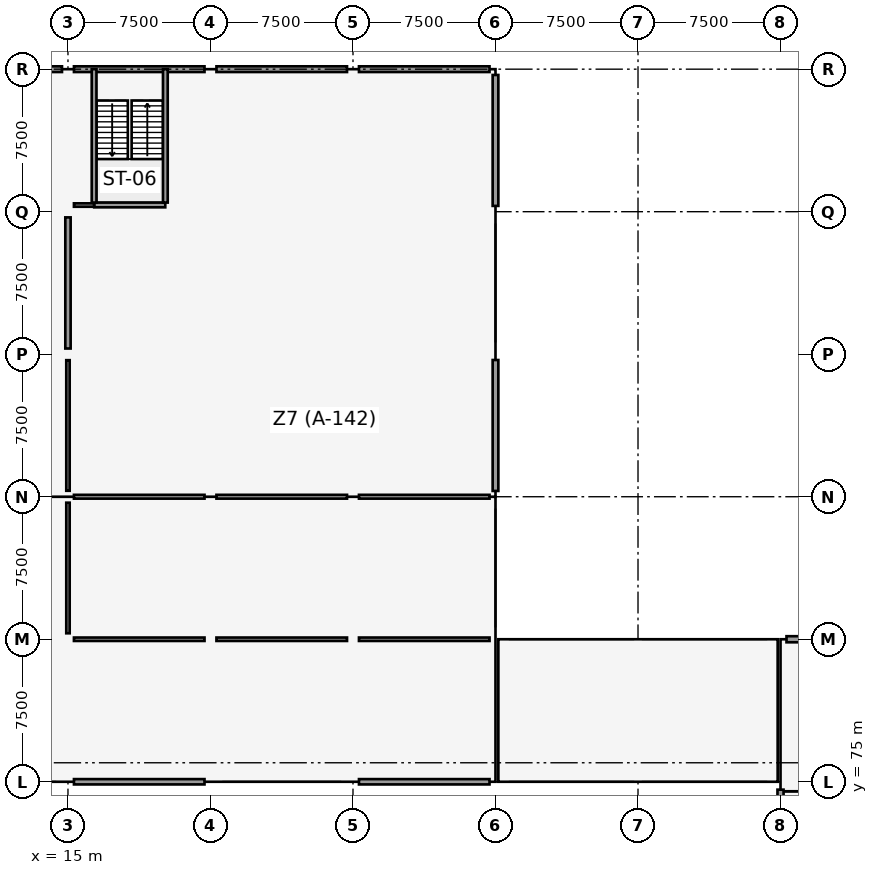
"""IFC4 building model, lengths in metres.
Left out: names, types, materials, properties, quantities, classifications, styles, units other than length and angle.
Written with IfcOpenShell. Run it as: python <this file> out.ifc"""

import sys

from ifc_helpers import new_model, si_unit, direction, frame, frame_2d, origin, origin_2d, place, context, subcontext, project, spatial, rectangle, extrude, element, fill, save


model = new_model("IFC4")
c1 = context("Model", 3, precision=1e-05, world=origin(), true_north=direction((0.0, 1.0)))
c2 = subcontext(c1, "Body", "Model", "MODEL_VIEW")
j1 = project(units=[si_unit("LENGTHUNIT", "METRE"), si_unit("PLANEANGLEUNIT", "RADIAN")], contexts=[c1])
p1 = place(None, origin())
s1 = spatial("IfcSite", under=j1, at=p1, CompositionType="ELEMENT")
p2 = place(p1, origin())
s2 = spatial("IfcBuilding", under=s1, at=p2, CompositionType="ELEMENT")
p3 = place(p2, frame((0.0, 0.0, 9.0)))
s3 = spatial("IfcBuildingStorey", under=s2, at=p3, CompositionType="ELEMENT", Elevation=9.0)
p4 = place(p3, frame((52.5, 75.0, 0.0), z_axis=(0.0, 0.0, 1.0), x_axis=(1.0, 0.0, 0.0)))
e1 = element("IfcColumn", 1, at=p4, inside=s3, PredefinedType="COLUMN", context=c2, shape_type="SweptSolid", body=[
    extrude(rectangle(XDim=0.8, YDim=0.8, at=origin_2d()), origin(), (0.0, 0.0, 1.0), 4.2),
])
p5 = place(p3, frame((52.5, 82.5, 0.0), z_axis=(0.0, 0.0, 1.0), x_axis=(1.0, 0.0, 0.0)))
e2 = element("IfcColumn", 2, at=p5, inside=s3, PredefinedType="COLUMN", context=c2, shape_type="SweptSolid", body=[
    extrude(rectangle(XDim=0.6, YDim=1.1, at=origin_2d()), origin(), (0.0, 0.0, 1.0), 4.2),
])
for number, where, z_axis, x_axis in (
    (3, (15.0, 75.0, 0.0), (0.0, 0.0, 1.0), (1.0, 0.0, 0.0)),
    (4, (15.0, 82.5, 0.0), (0.0, 0.0, 1.0), (1.0, 0.0, 0.0)),
    (5, (15.0, 90.0, 0.0), (0.0, 0.0, 1.0), (1.0, 0.0, 0.0)),
    (6, (15.0, 97.5, 0.0), (0.0, 0.0, 1.0), (1.0, 0.0, 0.0)),
    (7, (15.0, 105.0, 0.0), (0.0, 0.0, 1.0), (1.0, 0.0, 0.0)),
    (8, (15.0, 112.5, 0.0), (0.0, 0.0, 1.0), (1.0, 0.0, 0.0)),
    (9, (22.5, 75.0, 0.0), (0.0, 0.0, 1.0), (1.0, 0.0, 0.0)),
    (10, (22.5, 82.5, 0.0), (0.0, 0.0, 1.0), (1.0, 0.0, 0.0)),
    (11, (22.5, 90.0, 0.0), (0.0, 0.0, 1.0), (1.0, 0.0, 0.0)),
    (12, (22.5, 97.5, 0.0), (0.0, 0.0, 1.0), (1.0, 0.0, 0.0)),
    (13, (22.5, 105.0, 0.0), (0.0, 0.0, 1.0), (1.0, 0.0, 0.0)),
    (14, (22.5, 112.5, 0.0), (0.0, 0.0, 1.0), (1.0, 0.0, 0.0)),
    (15, (30.0, 75.0, 0.0), (0.0, 0.0, 1.0), (1.0, 0.0, 0.0)),
    (16, (30.0, 82.5, 0.0), (0.0, 0.0, 1.0), (1.0, 0.0, 0.0)),
    (17, (30.0, 90.0, 0.0), (0.0, 0.0, 1.0), (1.0, 0.0, 0.0)),
    (18, (30.0, 97.5, 0.0), (0.0, 0.0, 1.0), (1.0, 0.0, 0.0)),
    (19, (30.0, 105.0, 0.0), (0.0, 0.0, 1.0), (1.0, 0.0, 0.0)),
    (20, (30.0, 112.5, 0.0), (0.0, 0.0, 1.0), (1.0, 0.0, 0.0)),
    (21, (37.5, 75.0, 0.0), (0.0, 0.0, 1.0), (1.0, 0.0, 0.0)),
    (22, (37.5, 82.5, 0.0), (0.0, 0.0, 1.0), (1.0, 0.0, 0.0)),
    (23, (37.5, 90.0, 0.0), (0.0, 0.0, 1.0), (1.0, 0.0, 0.0)),
    (24, (37.5, 97.5, 0.0), (0.0, 0.0, 1.0), (1.0, 0.0, 0.0)),
    (25, (37.5, 105.0, 0.0), (0.0, 0.0, 1.0), (1.0, 0.0, 0.0)),
    (26, (37.5, 112.5, 0.0), (0.0, 0.0, 1.0), (1.0, 0.0, 0.0)),
):
    element("IfcColumn", number, at=place(p3, frame(where, z_axis=z_axis, x_axis=x_axis)), inside=s3, PredefinedType="COLUMN", context=c2, shape_type="SweptSolid", body=[
        extrude(rectangle(XDim=0.6, YDim=0.6, at=origin_2d()), origin(), (0.0, 0.0, 1.0), 4.2),
    ])
p6 = place(p3, frame((15.0, 97.8, 0.0), z_axis=(0.0, 0.0, 1.0), x_axis=(0.0, 1.0, 0.0)))
e27 = element("IfcWall", 27, at=p6, inside=s3, PredefinedType="SHEAR", context=c2, shape_type="SweptSolid", body=[
    extrude(rectangle(XDim=6.9, YDim=0.28, at=frame_2d((3.45, 0.0))), origin(), (0.0, 0.0, 1.0), 3.9),
])
p7 = place(p3, frame((52.5, 67.915, 0.0), z_axis=(0.0, 0.0, 1.0), x_axis=(0.0, 1.0, 0.0)))
e28 = element("IfcWall", 28, at=p7, inside=s3, PredefinedType="SOLIDWALL", context=c2, shape_type="SweptSolid", body=[
    extrude(rectangle(XDim=6.67, YDim=0.32, at=frame_2d((3.335, 0.0))), origin(), (0.0, 0.0, 1.0), 2.92),
])
p8 = place(p3, frame((52.815, 82.5, 0.0), z_axis=(0.0, 0.0, 1.0), x_axis=(1.0, 0.0, 0.0)))
e29 = element("IfcWall", 29, at=p8, inside=s3, PredefinedType="SOLIDWALL", context=c2, shape_type="SweptSolid", body=[
    extrude(rectangle(XDim=6.77, YDim=0.32, at=frame_2d((3.385, 0.0))), origin(), (0.0, 0.0, 1.0), 3.12),
])
p9 = place(p8, frame((2.86, 0.0, 0.6)))
e30 = element("IfcOpeningElement", 30, at=p9, cuts=e29, PredefinedType="OPENING", context=c2, shape_type="SweptSolid", body=[
    extrude(rectangle(XDim=1.15, YDim=1.3, at=frame_2d((0.575, 0.65))), frame((0.0, 0.17, 0.0), z_axis=(0.0, -1.0, 0.0), x_axis=(1.0, 0.0, 0.0)), (0.0, 0.0, 1.0), 0.34),
])
p10 = place(p3, frame((8.12, 112.5, 0.0), z_axis=(0.0, 0.0, 1.0), x_axis=(1.0, 0.0, 0.0)))
e31 = element("IfcWall", 31, at=p10, inside=s3, PredefinedType="SOLIDWALL", context=c2, shape_type="SweptSolid", body=[
    extrude(rectangle(XDim=6.565, YDim=0.3, at=frame_2d((3.282, 0.0))), origin(), (0.0, 0.0, 1.0), 2.87),
])
p11 = place(p10, frame((2.205, 0.0, 0.6)))
e32 = element("IfcOpeningElement", 32, at=p11, cuts=e31, PredefinedType="OPENING", context=c2, shape_type="SweptSolid", body=[
    extrude(rectangle(XDim=1.85, YDim=1.8, at=frame_2d((0.925, 0.9))), frame((0.0, 0.16, 0.0), z_axis=(0.0, -1.0, 0.0), x_axis=(1.0, 0.0, 0.0)), (0.0, 0.0, 1.0), 0.32),
])
p12 = place(p3, frame((15.315, 112.5, 0.0), z_axis=(0.0, 0.0, 1.0), x_axis=(1.0, 0.0, 0.0)))
e33 = element("IfcWall", 33, at=p12, inside=s3, PredefinedType="SOLIDWALL", context=c2, shape_type="SweptSolid", body=[
    extrude(rectangle(XDim=6.87, YDim=0.3, at=frame_2d((3.435, 0.0))), origin(), (0.0, 0.0, 1.0), 2.87),
])
p13 = place(p3, frame((15.315, 75.0, 0.0), z_axis=(0.0, 0.0, 1.0), x_axis=(1.0, 0.0, 0.0)))
e34 = element("IfcWall", 34, at=p13, inside=s3, PredefinedType="SOLIDWALL", context=c2, shape_type="SweptSolid", body=[
    extrude(rectangle(XDim=6.87, YDim=0.28, at=frame_2d((3.435, 0.0))), origin(), (0.0, 0.0, 1.0), 2.87),
])
p14 = place(p13, frame((2.435, 0.0, 0.6)))
e35 = element("IfcOpeningElement", 35, at=p14, cuts=e34, PredefinedType="OPENING", context=c2, shape_type="SweptSolid", body=[
    extrude(rectangle(XDim=2.0, YDim=1.45, at=frame_2d((1.0, 0.725))), frame((0.0, 0.15, 0.0), z_axis=(0.0, -1.0, 0.0), x_axis=(1.0, 0.0, 0.0)), (0.0, 0.0, 1.0), 0.3),
])
p15 = place(p3, frame((22.815, 112.5, 0.0), z_axis=(0.0, 0.0, 1.0), x_axis=(1.0, 0.0, 0.0)))
e36 = element("IfcWall", 36, at=p15, inside=s3, PredefinedType="SOLIDWALL", context=c2, shape_type="SweptSolid", body=[
    extrude(rectangle(XDim=6.87, YDim=0.3, at=frame_2d((3.435, 0.0))), origin(), (0.0, 0.0, 1.0), 3.12),
])
p16 = place(p15, frame((2.36, 0.0, 0.6)))
e37 = element("IfcOpeningElement", 37, at=p16, cuts=e36, PredefinedType="OPENING", context=c2, shape_type="SweptSolid", body=[
    extrude(rectangle(XDim=2.15, YDim=1.45, at=frame_2d((1.075, 0.725))), frame((0.0, 0.16, 0.0), z_axis=(0.0, -1.0, 0.0), x_axis=(1.0, 0.0, 0.0)), (0.0, 0.0, 1.0), 0.32),
])
p17 = place(p3, frame((30.315, 112.5, 0.0), z_axis=(0.0, 0.0, 1.0), x_axis=(1.0, 0.0, 0.0)))
e38 = element("IfcWall", 38, at=p17, inside=s3, PredefinedType="SOLIDWALL", context=c2, shape_type="SweptSolid", body=[
    extrude(rectangle(XDim=6.87, YDim=0.3, at=frame_2d((3.435, 0.0))), origin(), (0.0, 0.0, 1.0), 3.12),
])
p18 = place(p17, frame((2.86, 0.0, 0.6)))
e39 = element("IfcOpeningElement", 39, at=p18, cuts=e38, PredefinedType="OPENING", context=c2, shape_type="SweptSolid", body=[
    extrude(rectangle(XDim=1.15, YDim=1.3, at=frame_2d((0.575, 0.65))), frame((0.0, 0.16, 0.0), z_axis=(0.0, -1.0, 0.0), x_axis=(1.0, 0.0, 0.0)), (0.0, 0.0, 1.0), 0.32),
])
p19 = place(p3, frame((30.315, 75.0, 0.0), z_axis=(0.0, 0.0, 1.0), x_axis=(1.0, 0.0, 0.0)))
e40 = element("IfcWall", 40, at=p19, inside=s3, PredefinedType="SOLIDWALL", context=c2, shape_type="SweptSolid", body=[
    extrude(rectangle(XDim=6.87, YDim=0.28, at=frame_2d((3.435, 0.0))), origin(), (0.0, 0.0, 1.0), 3.12),
])
p20 = place(p19, frame((2.86, 0.0, 0.6)))
e41 = element("IfcOpeningElement", 41, at=p20, cuts=e40, PredefinedType="OPENING", context=c2, shape_type="SweptSolid", body=[
    extrude(rectangle(XDim=1.15, YDim=1.3, at=frame_2d((0.575, 0.65))), frame((0.0, 0.15, 0.0), z_axis=(0.0, -1.0, 0.0), x_axis=(1.0, 0.0, 0.0)), (0.0, 0.0, 1.0), 0.3),
])
p21 = place(p3, frame((37.5, 90.305, 0.0), z_axis=(0.0, 0.0, 1.0), x_axis=(0.0, 1.0, 0.0)))
e42 = element("IfcWall", 42, at=p21, inside=s3, PredefinedType="SOLIDWALL", context=c2, shape_type="SweptSolid", body=[
    extrude(rectangle(XDim=6.89, YDim=0.3, at=frame_2d((3.445, 0.0))), origin(), (0.0, 0.0, 1.0), 2.92),
])
p22 = place(p21, frame((2.845, 0.0, 0.6)))
e43 = element("IfcOpeningElement", 43, at=p22, cuts=e42, PredefinedType="OPENING", context=c2, shape_type="SweptSolid", body=[
    extrude(rectangle(XDim=1.2, YDim=1.2, at=frame_2d((0.6, 0.6))), frame((0.0, 0.16, 0.0), z_axis=(0.0, -1.0, 0.0), x_axis=(1.0, 0.0, 0.0)), (0.0, 0.0, 1.0), 0.32),
])
p23 = place(p3, frame((37.5, 105.305, 0.0), z_axis=(0.0, 0.0, 1.0), x_axis=(0.0, 1.0, 0.0)))
e44 = element("IfcWall", 44, at=p23, inside=s3, PredefinedType="SOLIDWALL", context=c2, shape_type="SweptSolid", body=[
    extrude(rectangle(XDim=6.89, YDim=0.3, at=frame_2d((3.445, 0.0))), origin(), (0.0, 0.0, 1.0), 3.07),
])
p24 = place(p23, frame((2.545, 0.0, 0.6)))
e45 = element("IfcOpeningElement", 45, at=p24, cuts=e44, PredefinedType="OPENING", context=c2, shape_type="SweptSolid", body=[
    extrude(rectangle(XDim=1.8, YDim=1.2, at=frame_2d((0.9, 0.6))), frame((0.0, 0.16, 0.0), z_axis=(0.0, -1.0, 0.0), x_axis=(1.0, 0.0, 0.0)), (0.0, 0.0, 1.0), 0.32),
])
p25 = place(p3, frame((16.38, 105.355, 0.0), z_axis=(0.0, 0.0, 1.0), x_axis=(1.0, 0.0, 0.0)))
e46 = element("IfcWall", 46, at=p25, inside=s3, PredefinedType="SOLIDWALL", context=c2, shape_type="SweptSolid", body=[
    extrude(rectangle(XDim=3.74, YDim=0.25, at=frame_2d((1.87, 0.0))), origin(), (0.0, 0.0, 1.0), 3.92),
])
p26 = place(p3, frame((16.375, 105.48, 0.0), z_axis=(0.0, 0.0, 1.0), x_axis=(0.0, 1.0, 0.0)))
e47 = element("IfcWall", 47, at=p26, inside=s3, PredefinedType="SOLIDWALL", context=c2, shape_type="SweptSolid", body=[
    extrude(rectangle(XDim=7.02, YDim=0.25, at=frame_2d((3.51, 0.0))), origin(), (0.0, 0.0, 1.0), 3.92),
])
p27 = place(p26, frame((5.47, 0.0, 0.0)))
e48 = element("IfcOpeningElement", 48, at=p27, cuts=e47, PredefinedType="OPENING", context=c2, shape_type="SweptSolid", body=[
    extrude(rectangle(XDim=1.1, YDim=2.15, at=frame_2d((0.55, 1.075))), frame((0.0, 0.135, 0.0), z_axis=(0.0, -1.0, 0.0), x_axis=(1.0, 0.0, 0.0)), (0.0, 0.0, 1.0), 0.27),
])
p28 = place(p3, frame((20.125, 105.48, 0.0), z_axis=(0.0, 0.0, 1.0), x_axis=(0.0, 1.0, 0.0)))
e49 = element("IfcWall", 49, at=p28, inside=s3, PredefinedType="SOLIDWALL", context=c2, shape_type="SweptSolid", body=[
    extrude(rectangle(XDim=7.02, YDim=0.25, at=frame_2d((3.51, 0.0))), origin(), (0.0, 0.0, 1.0), 3.92),
])
p29 = place(p3, frame((15.314, 105.35, 0.0), z_axis=(0.0, 0.0, 1.0), x_axis=(1.0, 0.0, 0.0)))
e50 = element("IfcWall", 50, at=p29, inside=s3, PredefinedType="PARTITIONING", context=c2, shape_type="SweptSolid", body=[
    extrude(rectangle(XDim=1.066, YDim=0.18, at=frame_2d((0.533, 0.0))), origin(), (0.0, 0.0, 1.0), 2.82),
])
p30 = place(p3, frame((15.314, 82.5, 0.0), z_axis=(0.0, 0.0, 1.0), x_axis=(1.0, 0.0, 0.0)))
e51 = element("IfcWall", 51, at=p30, inside=s3, PredefinedType="PARTITIONING", context=c2, shape_type="SweptSolid", body=[
    extrude(rectangle(XDim=6.872, YDim=0.18, at=frame_2d((3.436, 0.0))), origin(), (0.0, 0.0, 1.0), 2.87),
])
p31 = place(p3, frame((22.814, 82.5, 0.0), z_axis=(0.0, 0.0, 1.0), x_axis=(1.0, 0.0, 0.0)))
e52 = element("IfcWall", 52, at=p31, inside=s3, PredefinedType="PARTITIONING", context=c2, shape_type="SweptSolid", body=[
    extrude(rectangle(XDim=6.872, YDim=0.18, at=frame_2d((3.436, 0.0))), origin(), (0.0, 0.0, 1.0), 2.82),
])
p32 = place(p31, frame((2.911, 0.0, 0.0)))
e53 = element("IfcOpeningElement", 53, at=p32, cuts=e52, PredefinedType="OPENING", context=c2, shape_type="SweptSolid", body=[
    extrude(rectangle(XDim=1.05, YDim=2.12, at=frame_2d((0.525, 1.06))), frame((0.0, 0.1, 0.0), z_axis=(0.0, -1.0, 0.0), x_axis=(1.0, 0.0, 0.0)), (0.0, 0.0, 1.0), 0.2),
])
p33 = place(p3, frame((30.314, 82.5, 0.0), z_axis=(0.0, 0.0, 1.0), x_axis=(1.0, 0.0, 0.0)))
e54 = element("IfcWall", 54, at=p33, inside=s3, PredefinedType="PARTITIONING", context=c2, shape_type="SweptSolid", body=[
    extrude(rectangle(XDim=6.872, YDim=0.18, at=frame_2d((3.436, 0.0))), origin(), (0.0, 0.0, 1.0), 2.82),
])
for number, where, z_axis, x_axis in (
    (55, (15.314, 90.0, 0.0), (0.0, 0.0, 1.0), (1.0, 0.0, 0.0)),
    (56, (22.814, 90.0, 0.0), (0.0, 0.0, 1.0), (1.0, 0.0, 0.0)),
    (57, (30.314, 90.0, 0.0), (0.0, 0.0, 1.0), (1.0, 0.0, 0.0)),
):
    element("IfcWall", number, at=place(p3, frame(where, z_axis=z_axis, x_axis=x_axis)), inside=s3, PredefinedType="PARTITIONING", context=c2, shape_type="SweptSolid", body=[
        extrude(rectangle(XDim=6.872, YDim=0.2, at=frame_2d((3.436, 0.0))), origin(), (0.0, 0.0, 1.0), 2.82),
    ])
p34 = place(p3, frame((15.0, 82.814, 0.0), z_axis=(0.0, 0.0, 1.0), x_axis=(0.0, 1.0, 0.0)))
e58 = element("IfcWall", 58, at=p34, inside=s3, PredefinedType="PARTITIONING", context=c2, shape_type="SweptSolid", body=[
    extrude(rectangle(XDim=6.872, YDim=0.18, at=frame_2d((3.436, 0.0))), origin(), (0.0, 0.0, 1.0), 2.87),
])
p35 = place(p34, frame((2.911, 0.0, 0.0)))
e59 = element("IfcOpeningElement", 59, at=p35, cuts=e58, PredefinedType="OPENING", context=c2, shape_type="SweptSolid", body=[
    extrude(rectangle(XDim=1.05, YDim=2.12, at=frame_2d((0.525, 1.06))), frame((0.0, 0.1, 0.0), z_axis=(0.0, -1.0, 0.0), x_axis=(1.0, 0.0, 0.0)), (0.0, 0.0, 1.0), 0.2),
])
p36 = place(p3, frame((15.0, 90.314, 0.0), z_axis=(0.0, 0.0, 1.0), x_axis=(0.0, 1.0, 0.0)))
e60 = element("IfcWall", 60, at=p36, inside=s3, PredefinedType="PARTITIONING", context=c2, shape_type="SweptSolid", body=[
    extrude(rectangle(XDim=6.872, YDim=0.18, at=frame_2d((3.436, 0.0))), origin(), (0.0, 0.0, 1.0), 2.87),
])
p37 = place(p36, frame((2.911, 0.0, 0.0)))
e61 = element("IfcOpeningElement", 61, at=p37, cuts=e60, PredefinedType="OPENING", context=c2, shape_type="SweptSolid", body=[
    extrude(rectangle(XDim=1.05, YDim=2.12, at=frame_2d((0.525, 1.06))), frame((0.0, 0.1, 0.0), z_axis=(0.0, -1.0, 0.0), x_axis=(1.0, 0.0, 0.0)), (0.0, 0.0, 1.0), 0.2),
])
p38 = place(p14, origin())
e62 = element("IfcWindow", 62, at=p38, inside=s3, PartitioningType="SINGLE_PANEL", PredefinedType="WINDOW", context=c2, shape_type="SweptSolid", body=[
    extrude(rectangle(XDim=2.0, YDim=1.45, at=frame_2d((1.0, 0.725))), frame((0.0, 0.03, 0.0), z_axis=(0.0, -1.0, 0.0), x_axis=(1.0, 0.0, 0.0)), (0.0, 0.0, 1.0), 0.06),
])
fill(e35, e62)
p39 = place(p16, origin())
e63 = element("IfcWindow", 63, at=p39, inside=s3, PartitioningType="SINGLE_PANEL", PredefinedType="WINDOW", context=c2, shape_type="SweptSolid", body=[
    extrude(rectangle(XDim=2.15, YDim=1.45, at=frame_2d((1.075, 0.725))), frame((0.0, 0.03, 0.0), z_axis=(0.0, -1.0, 0.0), x_axis=(1.0, 0.0, 0.0)), (0.0, 0.0, 1.0), 0.06),
])
fill(e37, e63)
p40 = place(p18, origin())
e64 = element("IfcWindow", 64, at=p40, inside=s3, PartitioningType="SINGLE_PANEL", PredefinedType="WINDOW", context=c2, shape_type="SweptSolid", body=[
    extrude(rectangle(XDim=1.15, YDim=1.3, at=frame_2d((0.575, 0.65))), frame((0.0, 0.03, 0.0), z_axis=(0.0, -1.0, 0.0), x_axis=(1.0, 0.0, 0.0)), (0.0, 0.0, 1.0), 0.06),
])
fill(e39, e64)
p41 = place(p20, origin())
e65 = element("IfcWindow", 65, at=p41, inside=s3, PartitioningType="SINGLE_PANEL", PredefinedType="WINDOW", context=c2, shape_type="SweptSolid", body=[
    extrude(rectangle(XDim=1.15, YDim=1.3, at=frame_2d((0.575, 0.65))), frame((0.0, 0.03, 0.0), z_axis=(0.0, -1.0, 0.0), x_axis=(1.0, 0.0, 0.0)), (0.0, 0.0, 1.0), 0.06),
])
fill(e41, e65)
p42 = place(p22, origin())
e66 = element("IfcWindow", 66, at=p42, inside=s3, PartitioningType="SINGLE_PANEL", PredefinedType="WINDOW", context=c2, shape_type="SweptSolid", body=[
    extrude(rectangle(XDim=1.2, YDim=1.2, at=frame_2d((0.6, 0.6))), frame((0.0, 0.03, 0.0), z_axis=(0.0, -1.0, 0.0), x_axis=(1.0, 0.0, 0.0)), (0.0, 0.0, 1.0), 0.06),
])
fill(e43, e66)
p43 = place(p24, origin())
e67 = element("IfcWindow", 67, at=p43, inside=s3, PartitioningType="SINGLE_PANEL", PredefinedType="WINDOW", context=c2, shape_type="SweptSolid", body=[
    extrude(rectangle(XDim=1.8, YDim=1.2, at=frame_2d((0.9, 0.6))), frame((0.0, 0.03, 0.0), z_axis=(0.0, -1.0, 0.0), x_axis=(1.0, 0.0, 0.0)), (0.0, 0.0, 1.0), 0.06),
])
fill(e45, e67)
p44 = place(p27, origin())
e68 = element("IfcDoor", 68, at=p44, inside=s3, OperationType="SINGLE_SWING_LEFT", PredefinedType="DOOR", context=c2, shape_type="SweptSolid", body=[
    extrude(rectangle(XDim=1.1, YDim=2.15, at=frame_2d((0.55, 1.075))), frame((0.0, 0.025, 0.0), z_axis=(0.0, -1.0, 0.0), x_axis=(1.0, 0.0, 0.0)), (0.0, 0.0, 1.0), 0.05),
])
fill(e48, e68)
p45 = place(p32, origin())
e69 = element("IfcDoor", 69, at=p45, inside=s3, OperationType="SINGLE_SWING_RIGHT", PredefinedType="DOOR", context=c2, shape_type="SweptSolid", body=[
    extrude(rectangle(XDim=1.05, YDim=2.12, at=frame_2d((0.525, 1.06))), frame((0.0, 0.025, 0.0), z_axis=(0.0, -1.0, 0.0), x_axis=(1.0, 0.0, 0.0)), (0.0, 0.0, 1.0), 0.05),
])
fill(e53, e69)
p46 = place(p35, origin())
e70 = element("IfcDoor", 70, at=p46, inside=s3, OperationType="SINGLE_SWING_LEFT", PredefinedType="DOOR", context=c2, shape_type="SweptSolid", body=[
    extrude(rectangle(XDim=1.05, YDim=2.12, at=frame_2d((0.525, 1.06))), frame((0.0, 0.025, 0.0), z_axis=(0.0, -1.0, 0.0), x_axis=(1.0, 0.0, 0.0)), (0.0, 0.0, 1.0), 0.05),
])
fill(e59, e70)
p47 = place(p37, origin())
e71 = element("IfcDoor", 71, at=p47, inside=s3, OperationType="SINGLE_SWING_RIGHT", PredefinedType="DOOR", context=c2, shape_type="SweptSolid", body=[
    extrude(rectangle(XDim=1.05, YDim=2.12, at=frame_2d((0.525, 1.06))), frame((0.0, 0.025, 0.0), z_axis=(0.0, -1.0, 0.0), x_axis=(1.0, 0.0, 0.0)), (0.0, 0.0, 1.0), 0.05),
])
fill(e61, e71)
save(model, sys.argv[1])
